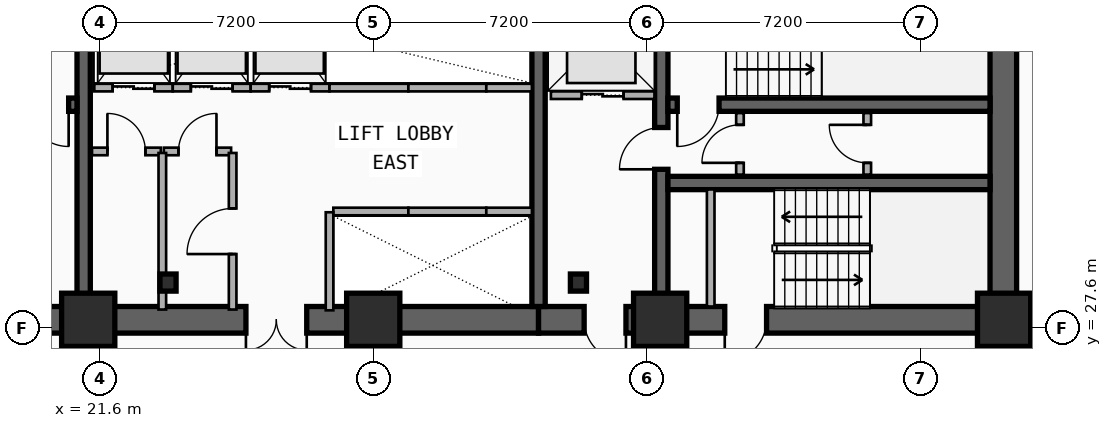
"""IFC4 building model, lengths in metres.
Left out: names, types, materials, properties, quantities, classifications, styles, units other than length and angle.
Written with IfcOpenShell. Run it as: python <this file> out.ifc"""

import sys

from ifc_helpers import new_model, si_unit, direction, frame, frame_2d, origin, origin_2d, place, context, subcontext, project, spatial, rectangle, i_section, extrude, element, fill, save


model = new_model("IFC4")
c1 = context("Model", 3, precision=1e-05, world=origin(), true_north=direction((0.0, 1.0)))
c2 = subcontext(c1, "Body", "Model", "MODEL_VIEW")
j1 = project(units=[si_unit("LENGTHUNIT", "METRE"), si_unit("PLANEANGLEUNIT", "RADIAN")], contexts=[c1])
p1 = place(None, origin())
s1 = spatial("IfcSite", under=j1, at=p1, CompositionType="ELEMENT")
p2 = place(p1, origin())
s2 = spatial("IfcBuilding", under=s1, at=p2, CompositionType="ELEMENT")
p3 = place(p2, frame((0.0, 0.0, 43.0)))
s3 = spatial("IfcBuildingStorey", under=s2, at=p3, CompositionType="ELEMENT", Elevation=43.0)
p4 = place(p3, frame((21.18, 27.82, 0.0), z_axis=(0.0, 0.0, 1.0), x_axis=(-1.0, 0.0, 0.0)))
e1 = element("IfcWall", 1, at=p4, inside=s3, PredefinedType="SHEAR", context=c2, shape_type="SweptSolid", body=[
    extrude(rectangle(XDim=9.03, YDim=0.7, at=frame_2d((4.515, 0.0))), origin(), (0.0, 0.0, 1.0), 3.5),
])
p5 = place(p4, frame((2.68, 0.0, 0.0)))
e2 = element("IfcOpeningElement", 2, at=p5, cuts=e1, PredefinedType="OPENING", context=c2, shape_type="SweptSolid", body=[
    extrude(rectangle(XDim=1.1, YDim=2.15, at=frame_2d((0.55, 1.075))), frame((0.0, 0.36, 0.0), z_axis=(0.0, -1.0, 0.0), x_axis=(1.0, 0.0, 0.0)), (0.0, 0.0, 1.0), 0.72),
])
p6 = place(p3, frame((33.15, 27.82, 0.0), z_axis=(0.0, 0.0, 1.0), x_axis=(-1.0, 0.0, 0.0)))
e3 = element("IfcWall", 3, at=p6, inside=s3, PredefinedType="SHEAR", context=c2, shape_type="SweptSolid", body=[
    extrude(rectangle(XDim=11.97, YDim=0.7, at=frame_2d((5.985, 0.0))), origin(), (0.0, 0.0, 1.0), 3.5),
])
p7 = place(p6, frame((6.1, 0.0, 0.0)))
e4 = element("IfcOpeningElement", 4, at=p7, cuts=e3, PredefinedType="OPENING", context=c2, shape_type="SweptSolid", body=[
    extrude(rectangle(XDim=1.6, YDim=2.2, at=frame_2d((0.8, 1.1))), frame((0.0, 0.36, 0.0), z_axis=(0.0, -1.0, 0.0), x_axis=(1.0, 0.0, 0.0)), (0.0, 0.0, 1.0), 0.72),
])
p8 = place(p3, frame((45.38, 27.82, 0.0), z_axis=(0.0, 0.0, 1.0), x_axis=(-1.0, 0.0, 0.0)))
e5 = element("IfcWall", 5, at=p8, inside=s3, PredefinedType="SHEAR", context=c2, shape_type="SweptSolid", body=[
    extrude(rectangle(XDim=12.23, YDim=0.7, at=frame_2d((6.115, 0.0))), origin(), (0.0, 0.0, 1.0), 3.5),
])
p9 = place(p8, frame((9.93, 0.0, 0.0)))
e6 = element("IfcOpeningElement", 6, at=p9, cuts=e5, PredefinedType="OPENING", context=c2, shape_type="SweptSolid", body=[
    extrude(rectangle(XDim=1.1, YDim=2.15, at=frame_2d((0.55, 1.075))), frame((0.0, 0.36, 0.0), z_axis=(0.0, -1.0, 0.0), x_axis=(1.0, 0.0, 0.0)), (0.0, 0.0, 1.0), 0.72),
])
p10 = place(p8, frame((6.23, 0.0, 0.0)))
e7 = element("IfcOpeningElement", 7, at=p10, cuts=e5, PredefinedType="OPENING", context=c2, shape_type="SweptSolid", body=[
    extrude(rectangle(XDim=1.1, YDim=2.15, at=frame_2d((0.55, 1.075))), frame((0.0, 0.36, 0.0), z_axis=(0.0, -1.0, 0.0), x_axis=(1.0, 0.0, 0.0)), (0.0, 0.0, 1.0), 0.72),
])
p11 = place(p3, frame((45.38, 28.17, 0.0), z_axis=(0.0, 0.0, 1.0), x_axis=(0.0, 1.0, 0.0)))
e8 = element("IfcWall", 8, at=p11, inside=s3, PredefinedType="SHEAR", context=c2, shape_type="SweptSolid", body=[
    extrude(rectangle(XDim=8.53, YDim=0.7, at=frame_2d((4.265, 0.0))), origin(), (0.0, 0.0, 1.0), 3.5),
])
for number, where, z_axis, x_axis in (
    (9, (21.18, 28.17, 0.0), (0.0, 0.0, 1.0), (0.0, 1.0, 0.0)),
    (10, (33.15, 28.17, 0.0), (0.0, 0.0, 1.0), (0.0, 1.0, 0.0)),
):
    element("IfcWall", number, at=place(p3, frame(where, z_axis=z_axis, x_axis=x_axis)), inside=s3, PredefinedType="SHEAR", context=c2, shape_type="SweptSolid", body=[
        extrude(rectangle(XDim=8.53, YDim=0.35, at=frame_2d((4.265, 0.0))), origin(), (0.0, 0.0, 1.0), 3.5),
    ])
p12 = place(p3, frame((36.38, 28.17, 0.0), z_axis=(0.0, 0.0, 1.0), x_axis=(0.0, 1.0, 0.0)))
e11 = element("IfcWall", 11, at=p12, inside=s3, PredefinedType="SHEAR", context=c2, shape_type="SweptSolid", body=[
    extrude(rectangle(XDim=8.53, YDim=0.35, at=frame_2d((4.265, 0.0))), origin(), (0.0, 0.0, 1.0), 3.5),
])
p13 = place(p12, frame((3.61, 0.0, 0.0)))
e12 = element("IfcOpeningElement", 12, at=p13, cuts=e11, PredefinedType="OPENING", context=c2, shape_type="SweptSolid", body=[
    extrude(rectangle(XDim=1.1, YDim=2.15, at=frame_2d((0.55, 1.075))), frame((0.0, 0.185, 0.0), z_axis=(0.0, -1.0, 0.0), x_axis=(1.0, 0.0, 0.0)), (0.0, 0.0, 1.0), 0.37),
])
p14 = place(p3, frame((21.005, 33.48, 0.0), z_axis=(0.0, 0.0, 1.0), x_axis=(-1.0, 0.0, 0.0)))
e13 = element("IfcWall", 13, at=p14, inside=s3, PredefinedType="SHEAR", context=c2, shape_type="SweptSolid", body=[
    extrude(rectangle(XDim=8.505, YDim=0.35, at=frame_2d((4.252, 0.0))), origin(), (0.0, 0.0, 1.0), 3.5),
])
p15 = place(p14, frame((0.22, 0.0, 0.0)))
e14 = element("IfcOpeningElement", 14, at=p15, cuts=e13, PredefinedType="OPENING", context=c2, shape_type="SweptSolid", body=[
    extrude(rectangle(XDim=1.1, YDim=2.15, at=frame_2d((0.55, 1.075))), frame((0.0, 0.185, 0.0), z_axis=(0.0, -1.0, 0.0), x_axis=(1.0, 0.0, 0.0)), (0.0, 0.0, 1.0), 0.37),
])
p16 = place(p3, frame((45.03, 33.48, 0.0), z_axis=(0.0, 0.0, 1.0), x_axis=(-1.0, 0.0, 0.0)))
e15 = element("IfcWall", 15, at=p16, inside=s3, PredefinedType="SHEAR", context=c2, shape_type="SweptSolid", body=[
    extrude(rectangle(XDim=8.475, YDim=0.35, at=frame_2d((4.238, 0.0))), origin(), (0.0, 0.0, 1.0), 3.5),
])
p17 = place(p16, frame((7.13, 0.0, 0.0)))
e16 = element("IfcOpeningElement", 16, at=p17, cuts=e15, PredefinedType="OPENING", context=c2, shape_type="SweptSolid", body=[
    extrude(rectangle(XDim=1.1, YDim=2.15, at=frame_2d((0.55, 1.075))), frame((0.0, 0.185, 0.0), z_axis=(0.0, -1.0, 0.0), x_axis=(1.0, 0.0, 0.0)), (0.0, 0.0, 1.0), 0.37),
])
p18 = place(p3, frame((36.555, 31.42, 0.0), z_axis=(0.0, 0.0, 1.0), x_axis=(1.0, 0.0, 0.0)))
e17 = element("IfcWall", 17, at=p18, inside=s3, PredefinedType="SHEAR", context=c2, shape_type="SweptSolid", body=[
    extrude(rectangle(XDim=8.475, YDim=0.35, at=frame_2d((4.238, 0.0))), origin(), (0.0, 0.0, 1.0), 3.5),
])
for number, where, z_axis, x_axis in (
    (18, (23.4, 28.8, 0.0), (0.0, 0.0, 1.0), (1.0, 0.0, 0.0)),
    (19, (34.2, 28.8, 0.0), (0.0, 0.0, 1.0), (1.0, 0.0, 0.0)),
):
    element("IfcColumn", number, at=place(p3, frame(where, z_axis=z_axis, x_axis=x_axis)), inside=s3, PredefinedType="COLUMN", context=c2, shape_type="SweptSolid", body=[
        extrude(i_section(OverallWidth=0.424, OverallDepth=0.45, WebThickness=0.041, FlangeThickness=0.065, FilletRadius=0.015, at=origin_2d()), origin(), (0.0, 0.0, 1.0), 3.5),
    ])
for number, where, z_axis, x_axis in (
    (20, (21.3, 27.82, 0.0), (0.0, 0.0, 1.0), (1.0, 0.0, 0.0)),
    (21, (28.8, 27.82, 0.0), (0.0, 0.0, 1.0), (1.0, 0.0, 0.0)),
    (22, (36.35, 27.82, 0.0), (0.0, 0.0, 1.0), (1.0, 0.0, 0.0)),
    (23, (45.4, 27.82, 0.0), (0.0, 0.0, 1.0), (1.0, 0.0, 0.0)),
):
    element("IfcColumn", number, at=place(p3, frame(where, z_axis=z_axis, x_axis=x_axis)), inside=s3, PredefinedType="COLUMN", context=c2, shape_type="SweptSolid", body=[
        extrude(rectangle(XDim=1.4, YDim=1.4, at=origin_2d()), origin(), (0.0, 0.0, 1.0), 3.5),
    ])
p19 = place(p3, frame((33.475, 33.73, 0.0), z_axis=(0.0, 0.0, 1.0), x_axis=(1.0, 0.0, 0.0)))
e24 = element("IfcWall", 24, at=p19, inside=s3, PredefinedType="PARTITIONING", context=c2, shape_type="SweptSolid", body=[
    extrude(rectangle(XDim=2.725, YDim=0.2, at=frame_2d((1.362, 0.0))), origin(), (0.0, 0.0, 1.0), 2.212),
])
p20 = place(p19, frame((0.812, 0.0, 0.0)))
e25 = element("IfcOpeningElement", 25, at=p20, cuts=e24, PredefinedType="OPENING", context=c2, shape_type="SweptSolid", body=[
    extrude(rectangle(XDim=1.1, YDim=2.15, at=frame_2d((0.55, 1.075))), frame((0.0, 0.11, 0.0), z_axis=(0.0, -1.0, 0.0), x_axis=(1.0, 0.0, 0.0)), (0.0, 0.0, 1.0), 0.22),
])
p21 = place(p3, frame((27.75, 30.67, 0.0), z_axis=(0.0, 0.0, 1.0), x_axis=(1.0, 0.0, 0.0)))
e26 = element("IfcWall", 26, at=p21, inside=s3, PredefinedType="PARTITIONING", context=c2, shape_type="SweptSolid", body=[
    extrude(rectangle(XDim=1.975, YDim=0.2, at=frame_2d((0.988, 0.0))), origin(), (0.0, 0.0, 1.0), 2.212),
])
p22 = place(p3, frame((27.65, 28.07, 0.0), z_axis=(0.0, 0.0, 1.0), x_axis=(0.0, 1.0, 0.0)))
e27 = element("IfcWall", 27, at=p22, inside=s3, PredefinedType="PARTITIONING", context=c2, shape_type="SweptSolid", body=[
    extrude(rectangle(XDim=2.58, YDim=0.2, at=frame_2d((1.29, 0.0))), origin(), (0.0, 0.0, 1.0), 2.212),
])
p23 = place(p3, frame((29.725, 30.67, 0.0), z_axis=(0.0, 0.0, 1.0), x_axis=(1.0, 0.0, 0.0)))
e28 = element("IfcWall", 28, at=p23, inside=s3, PredefinedType="PARTITIONING", context=c2, shape_type="SweptSolid", body=[
    extrude(rectangle(XDim=2.05, YDim=0.2, at=frame_2d((1.025, 0.0))), origin(), (0.0, 0.0, 1.0), 2.62),
])
p24 = place(p3, frame((31.775, 30.67, 0.0), z_axis=(0.0, 0.0, 1.0), x_axis=(1.0, 0.0, 0.0)))
e29 = element("IfcWall", 29, at=p24, inside=s3, PredefinedType="PARTITIONING", context=c2, shape_type="SweptSolid", body=[
    extrude(rectangle(XDim=1.2, YDim=0.2, at=frame_2d((0.6, 0.0))), origin(), (0.0, 0.0, 1.0), 2.62),
])
p25 = place(p3, frame((21.46, 33.93, 0.0), z_axis=(0.0, 0.0, 1.0), x_axis=(1.0, 0.0, 0.0)))
e30 = element("IfcWall", 30, at=p25, inside=s3, PredefinedType="PARTITIONING", context=c2, shape_type="SweptSolid", body=[
    extrude(rectangle(XDim=2.065, YDim=0.2, at=frame_2d((1.032, 0.0))), origin(), (0.0, 0.0, 1.0), 2.212),
])
p26 = place(p25, frame((0.482, 0.0, 0.0)))
e31 = element("IfcOpeningElement", 31, at=p26, cuts=e30, PredefinedType="OPENING", context=c2, shape_type="SweptSolid", body=[
    extrude(rectangle(XDim=1.1, YDim=2.15, at=frame_2d((0.55, 1.075))), frame((0.0, 0.11, 0.0), z_axis=(0.0, -1.0, 0.0), x_axis=(1.0, 0.0, 0.0)), (0.0, 0.0, 1.0), 0.22),
])
p27 = place(p3, frame((23.525, 33.93, 0.0), z_axis=(0.0, 0.0, 1.0), x_axis=(1.0, 0.0, 0.0)))
e32 = element("IfcWall", 32, at=p27, inside=s3, PredefinedType="PARTITIONING", context=c2, shape_type="SweptSolid", body=[
    extrude(rectangle(XDim=2.05, YDim=0.2, at=frame_2d((1.025, 0.0))), origin(), (0.0, 0.0, 1.0), 3.24),
])
p28 = place(p27, frame((0.475, 0.0, 0.0)))
e33 = element("IfcOpeningElement", 33, at=p28, cuts=e32, PredefinedType="OPENING", context=c2, shape_type="SweptSolid", body=[
    extrude(rectangle(XDim=1.1, YDim=2.15, at=frame_2d((0.55, 1.075))), frame((0.0, 0.11, 0.0), z_axis=(0.0, -1.0, 0.0), x_axis=(1.0, 0.0, 0.0)), (0.0, 0.0, 1.0), 0.22),
])
p29 = place(p3, frame((25.575, 33.93, 0.0), z_axis=(0.0, 0.0, 1.0), x_axis=(1.0, 0.0, 0.0)))
e34 = element("IfcWall", 34, at=p29, inside=s3, PredefinedType="PARTITIONING", context=c2, shape_type="SweptSolid", body=[
    extrude(rectangle(XDim=2.075, YDim=0.2, at=frame_2d((1.038, 0.0))), origin(), (0.0, 0.0, 1.0), 3.24),
])
p30 = place(p29, frame((0.488, 0.0, 0.0)))
e35 = element("IfcOpeningElement", 35, at=p30, cuts=e34, PredefinedType="OPENING", context=c2, shape_type="SweptSolid", body=[
    extrude(rectangle(XDim=1.1, YDim=2.15, at=frame_2d((0.55, 1.075))), frame((0.0, 0.11, 0.0), z_axis=(0.0, -1.0, 0.0), x_axis=(1.0, 0.0, 0.0)), (0.0, 0.0, 1.0), 0.22),
])
p31 = place(p3, frame((27.65, 33.93, 0.0), z_axis=(0.0, 0.0, 1.0), x_axis=(1.0, 0.0, 0.0)))
e36 = element("IfcWall", 36, at=p31, inside=s3, PredefinedType="PARTITIONING", context=c2, shape_type="SweptSolid", body=[
    extrude(rectangle(XDim=2.075, YDim=0.2, at=frame_2d((1.038, 0.0))), origin(), (0.0, 0.0, 1.0), 2.212),
])
p32 = place(p3, frame((29.725, 33.93, 0.0), z_axis=(0.0, 0.0, 1.0), x_axis=(1.0, 0.0, 0.0)))
e37 = element("IfcWall", 37, at=p32, inside=s3, PredefinedType="PARTITIONING", context=c2, shape_type="SweptSolid", body=[
    extrude(rectangle(XDim=2.05, YDim=0.2, at=frame_2d((1.025, 0.0))), origin(), (0.0, 0.0, 1.0), 3.24),
])
p33 = place(p3, frame((31.775, 33.93, 0.0), z_axis=(0.0, 0.0, 1.0), x_axis=(1.0, 0.0, 0.0)))
e38 = element("IfcWall", 38, at=p33, inside=s3, PredefinedType="PARTITIONING", context=c2, shape_type="SweptSolid", body=[
    extrude(rectangle(XDim=1.2, YDim=0.2, at=frame_2d((0.6, 0.0))), origin(), (0.0, 0.0, 1.0), 3.24),
])
p34 = place(p3, frame((37.68, 28.17, 0.0), z_axis=(0.0, 0.0, 1.0), x_axis=(0.0, 1.0, 0.0)))
e39 = element("IfcWall", 39, at=p34, inside=s3, PredefinedType="PARTITIONING", context=c2, shape_type="SweptSolid", body=[
    extrude(rectangle(XDim=3.08, YDim=0.2, at=frame_2d((1.54, 0.0))), origin(), (0.0, 0.0, 1.0), 2.62),
])
p35 = place(p3, frame((38.45, 31.64, 0.0), z_axis=(0.0, 0.0, 1.0), x_axis=(0.0, 1.0, 0.0)))
e40 = element("IfcWall", 40, at=p35, inside=s3, PredefinedType="PARTITIONING", context=c2, shape_type="SweptSolid", body=[
    extrude(rectangle(XDim=1.62, YDim=0.2, at=frame_2d((0.81, 0.0))), origin(), (0.0, 0.0, 1.0), 3.24),
])
p36 = place(p35, frame((0.31, 0.0, 0.0)))
e41 = element("IfcOpeningElement", 41, at=p36, cuts=e40, PredefinedType="OPENING", context=c2, shape_type="SweptSolid", body=[
    extrude(rectangle(XDim=1.0, YDim=2.15, at=frame_2d((0.5, 1.075))), frame((0.0, 0.11, 0.0), z_axis=(0.0, -1.0, 0.0), x_axis=(1.0, 0.0, 0.0)), (0.0, 0.0, 1.0), 0.22),
])
p37 = place(p3, frame((41.8, 31.64, 0.0), z_axis=(0.0, 0.0, 1.0), x_axis=(0.0, 1.0, 0.0)))
e42 = element("IfcWall", 42, at=p37, inside=s3, PredefinedType="PARTITIONING", context=c2, shape_type="SweptSolid", body=[
    extrude(rectangle(XDim=1.62, YDim=0.2, at=frame_2d((0.81, 0.0))), origin(), (0.0, 0.0, 1.0), 3.24),
])
p38 = place(p37, frame((0.31, 0.0, 0.0)))
e43 = element("IfcOpeningElement", 43, at=p38, cuts=e42, PredefinedType="OPENING", context=c2, shape_type="SweptSolid", body=[
    extrude(rectangle(XDim=1.0, YDim=2.15, at=frame_2d((0.5, 1.075))), frame((0.0, 0.11, 0.0), z_axis=(0.0, -1.0, 0.0), x_axis=(1.0, 0.0, 0.0)), (0.0, 0.0, 1.0), 0.22),
])
p39 = place(p3, frame((21.4, 32.25, 0.0), z_axis=(0.0, 0.0, 1.0), x_axis=(1.0, 0.0, 0.0)))
e44 = element("IfcWall", 44, at=p39, inside=s3, PredefinedType="PARTITIONING", context=c2, shape_type="SweptSolid", body=[
    extrude(rectangle(XDim=1.81, YDim=0.2, at=frame_2d((0.905, 0.0))), origin(), (0.0, 0.0, 1.0), 2.28),
])
p40 = place(p39, frame((0.405, 0.0, 0.0)))
e45 = element("IfcOpeningElement", 45, at=p40, cuts=e44, PredefinedType="OPENING", context=c2, shape_type="SweptSolid", body=[
    extrude(rectangle(XDim=1.0, YDim=2.15, at=frame_2d((0.5, 1.075))), frame((0.0, 0.11, 0.0), z_axis=(0.0, -1.0, 0.0), x_axis=(1.0, 0.0, 0.0)), (0.0, 0.0, 1.0), 0.22),
])
p41 = place(p3, frame((23.29, 32.25, 0.0), z_axis=(0.0, 0.0, 1.0), x_axis=(1.0, 0.0, 0.0)))
e46 = element("IfcWall", 46, at=p41, inside=s3, PredefinedType="PARTITIONING", context=c2, shape_type="SweptSolid", body=[
    extrude(rectangle(XDim=1.77, YDim=0.2, at=frame_2d((0.885, 0.0))), origin(), (0.0, 0.0, 1.0), 3.24),
])
p42 = place(p41, frame((0.385, 0.0, 0.0)))
e47 = element("IfcOpeningElement", 47, at=p42, cuts=e46, PredefinedType="OPENING", context=c2, shape_type="SweptSolid", body=[
    extrude(rectangle(XDim=1.0, YDim=2.15, at=frame_2d((0.5, 1.075))), frame((0.0, 0.11, 0.0), z_axis=(0.0, -1.0, 0.0), x_axis=(1.0, 0.0, 0.0)), (0.0, 0.0, 1.0), 0.22),
])
p43 = place(p3, frame((25.1, 28.09, 0.0), z_axis=(0.0, 0.0, 1.0), x_axis=(0.0, 1.0, 0.0)))
e48 = element("IfcWall", 48, at=p43, inside=s3, PredefinedType="PARTITIONING", context=c2, shape_type="SweptSolid", body=[
    extrude(rectangle(XDim=4.12, YDim=0.2, at=frame_2d((2.06, 0.0))), origin(), (0.0, 0.0, 1.0), 2.62),
])
p44 = place(p43, frame((1.46, 0.0, 0.0)))
e49 = element("IfcOpeningElement", 49, at=p44, cuts=e48, PredefinedType="OPENING", context=c2, shape_type="SweptSolid", body=[
    extrude(rectangle(XDim=1.2, YDim=2.15, at=frame_2d((0.6, 1.075))), frame((0.0, 0.11, 0.0), z_axis=(0.0, -1.0, 0.0), x_axis=(1.0, 0.0, 0.0)), (0.0, 0.0, 1.0), 0.22),
])
p45 = place(p3, frame((23.25, 28.09, 0.0), z_axis=(0.0, 0.0, 1.0), x_axis=(0.0, 1.0, 0.0)))
e50 = element("IfcWall", 50, at=p45, inside=s3, PredefinedType="PARTITIONING", context=c2, shape_type="SweptSolid", body=[
    extrude(rectangle(XDim=4.12, YDim=0.2, at=frame_2d((2.06, 0.0))), origin(), (0.0, 0.0, 1.0), 2.62),
])
p46 = place(p3, frame((45.41, 27.6, 0.0), z_axis=(0.0, 0.0, 1.0), x_axis=(1.0, 0.0, 0.0)))
e51 = element("IfcWall", 51, at=p46, inside=s3, PredefinedType="PARTITIONING", context=c2, shape_type="SweptSolid", body=[
    extrude(rectangle(XDim=0.91, YDim=0.16, at=frame_2d((0.455, 0.0))), origin(), (0.0, 0.0, 1.0), 2.28),
])
p47 = place(p20, origin())
e52 = element("IfcDoor", 52, at=p47, inside=s3, OperationType="DOUBLE_DOOR_SLIDING", PredefinedType="DOOR", context=c2, shape_type="SweptSolid", body=[
    extrude(rectangle(XDim=1.1, YDim=2.15, at=frame_2d((0.55, 1.075))), frame((0.0, 0.025, 0.0), z_axis=(0.0, -1.0, 0.0), x_axis=(1.0, 0.0, 0.0)), (0.0, 0.0, 1.0), 0.05),
])
fill(e25, e52)
p48 = place(p26, origin())
e53 = element("IfcDoor", 53, at=p48, inside=s3, OperationType="DOUBLE_DOOR_SLIDING", PredefinedType="DOOR", context=c2, shape_type="SweptSolid", body=[
    extrude(rectangle(XDim=1.1, YDim=2.15, at=frame_2d((0.55, 1.075))), frame((0.0, 0.025, 0.0), z_axis=(0.0, -1.0, 0.0), x_axis=(1.0, 0.0, 0.0)), (0.0, 0.0, 1.0), 0.05),
])
fill(e31, e53)
p49 = place(p28, origin())
e54 = element("IfcDoor", 54, at=p49, inside=s3, OperationType="DOUBLE_DOOR_SLIDING", PredefinedType="DOOR", context=c2, shape_type="SweptSolid", body=[
    extrude(rectangle(XDim=1.1, YDim=2.15, at=frame_2d((0.55, 1.075))), frame((0.0, 0.025, 0.0), z_axis=(0.0, -1.0, 0.0), x_axis=(1.0, 0.0, 0.0)), (0.0, 0.0, 1.0), 0.05),
])
fill(e33, e54)
p50 = place(p30, origin())
e55 = element("IfcDoor", 55, at=p50, inside=s3, OperationType="DOUBLE_DOOR_SLIDING", PredefinedType="DOOR", context=c2, shape_type="SweptSolid", body=[
    extrude(rectangle(XDim=1.1, YDim=2.15, at=frame_2d((0.55, 1.075))), frame((0.0, 0.025, 0.0), z_axis=(0.0, -1.0, 0.0), x_axis=(1.0, 0.0, 0.0)), (0.0, 0.0, 1.0), 0.05),
])
fill(e35, e55)
p51 = place(p15, origin())
e56 = element("IfcDoor", 56, at=p51, inside=s3, OperationType="SINGLE_SWING_LEFT", PredefinedType="DOOR", context=c2, shape_type="SweptSolid", body=[
    extrude(rectangle(XDim=1.1, YDim=2.15, at=frame_2d((0.55, 1.075))), frame((0.0, 0.025, 0.0), z_axis=(0.0, -1.0, 0.0), x_axis=(1.0, 0.0, 0.0)), (0.0, 0.0, 1.0), 0.05),
])
fill(e14, e56)
p52 = place(p17, origin())
e57 = element("IfcDoor", 57, at=p52, inside=s3, OperationType="SINGLE_SWING_RIGHT", PredefinedType="DOOR", context=c2, shape_type="SweptSolid", body=[
    extrude(rectangle(XDim=1.1, YDim=2.15, at=frame_2d((0.55, 1.075))), frame((0.0, 0.025, 0.0), z_axis=(0.0, -1.0, 0.0), x_axis=(1.0, 0.0, 0.0)), (0.0, 0.0, 1.0), 0.05),
])
fill(e16, e57)
p53 = place(p13, origin())
e58 = element("IfcDoor", 58, at=p53, inside=s3, OperationType="SINGLE_SWING_LEFT", PredefinedType="DOOR", context=c2, shape_type="SweptSolid", body=[
    extrude(rectangle(XDim=1.1, YDim=2.15, at=frame_2d((0.55, 1.075))), frame((0.0, 0.025, 0.0), z_axis=(0.0, -1.0, 0.0), x_axis=(1.0, 0.0, 0.0)), (0.0, 0.0, 1.0), 0.05),
])
fill(e12, e58)
p54 = place(p9, origin())
e59 = element("IfcDoor", 59, at=p54, inside=s3, OperationType="SINGLE_SWING_LEFT", PredefinedType="DOOR", context=c2, shape_type="SweptSolid", body=[
    extrude(rectangle(XDim=1.1, YDim=2.15, at=frame_2d((0.55, 1.075))), frame((0.0, 0.025, 0.0), z_axis=(0.0, -1.0, 0.0), x_axis=(1.0, 0.0, 0.0)), (0.0, 0.0, 1.0), 0.05),
])
fill(e6, e59)
p55 = place(p10, origin())
e60 = element("IfcDoor", 60, at=p55, inside=s3, OperationType="SINGLE_SWING_RIGHT", PredefinedType="DOOR", context=c2, shape_type="SweptSolid", body=[
    extrude(rectangle(XDim=1.1, YDim=2.15, at=frame_2d((0.55, 1.075))), frame((0.0, 0.025, 0.0), z_axis=(0.0, -1.0, 0.0), x_axis=(1.0, 0.0, 0.0)), (0.0, 0.0, 1.0), 0.05),
])
fill(e7, e60)
p56 = place(p7, origin())
e61 = element("IfcDoor", 61, at=p56, inside=s3, OperationType="SINGLE_SWING_LEFT", PredefinedType="DOOR", context=c2, shape_type="SweptSolid", body=[
    extrude(rectangle(XDim=1.6, YDim=2.2, at=frame_2d((0.8, 1.1))), frame((0.0, 0.025, 0.0), z_axis=(0.0, -1.0, 0.0), x_axis=(1.0, 0.0, 0.0)), (0.0, 0.0, 1.0), 0.05),
])
fill(e4, e61)
p57 = place(p36, origin())
e62 = element("IfcDoor", 62, at=p57, inside=s3, OperationType="SINGLE_SWING_LEFT", PredefinedType="DOOR", context=c2, shape_type="SweptSolid", body=[
    extrude(rectangle(XDim=1.0, YDim=2.15, at=frame_2d((0.5, 1.075))), frame((0.0, 0.025, 0.0), z_axis=(0.0, -1.0, 0.0), x_axis=(1.0, 0.0, 0.0)), (0.0, 0.0, 1.0), 0.05),
])
fill(e41, e62)
p58 = place(p38, origin())
e63 = element("IfcDoor", 63, at=p58, inside=s3, OperationType="SINGLE_SWING_RIGHT", PredefinedType="DOOR", context=c2, shape_type="SweptSolid", body=[
    extrude(rectangle(XDim=1.0, YDim=2.15, at=frame_2d((0.5, 1.075))), frame((0.0, 0.025, 0.0), z_axis=(0.0, -1.0, 0.0), x_axis=(1.0, 0.0, 0.0)), (0.0, 0.0, 1.0), 0.05),
])
fill(e43, e63)
p59 = place(p40, origin())
e64 = element("IfcDoor", 64, at=p59, inside=s3, OperationType="SINGLE_SWING_LEFT", PredefinedType="DOOR", context=c2, shape_type="SweptSolid", body=[
    extrude(rectangle(XDim=1.0, YDim=2.15, at=frame_2d((0.5, 1.075))), frame((0.0, 0.025, 0.0), z_axis=(0.0, -1.0, 0.0), x_axis=(1.0, 0.0, 0.0)), (0.0, 0.0, 1.0), 0.05),
])
fill(e45, e64)
p60 = place(p42, origin())
e65 = element("IfcDoor", 65, at=p60, inside=s3, OperationType="SINGLE_SWING_RIGHT", PredefinedType="DOOR", context=c2, shape_type="SweptSolid", body=[
    extrude(rectangle(XDim=1.0, YDim=2.15, at=frame_2d((0.5, 1.075))), frame((0.0, 0.025, 0.0), z_axis=(0.0, -1.0, 0.0), x_axis=(1.0, 0.0, 0.0)), (0.0, 0.0, 1.0), 0.05),
])
fill(e47, e65)
p61 = place(p44, origin())
e66 = element("IfcDoor", 66, at=p61, inside=s3, OperationType="SINGLE_SWING_LEFT", PredefinedType="DOOR", context=c2, shape_type="SweptSolid", body=[
    extrude(rectangle(XDim=1.2, YDim=2.15, at=frame_2d((0.6, 1.075))), frame((0.0, 0.025, 0.0), z_axis=(0.0, -1.0, 0.0), x_axis=(1.0, 0.0, 0.0)), (0.0, 0.0, 1.0), 0.05),
])
fill(e49, e66)
save(model, sys.argv[1])
